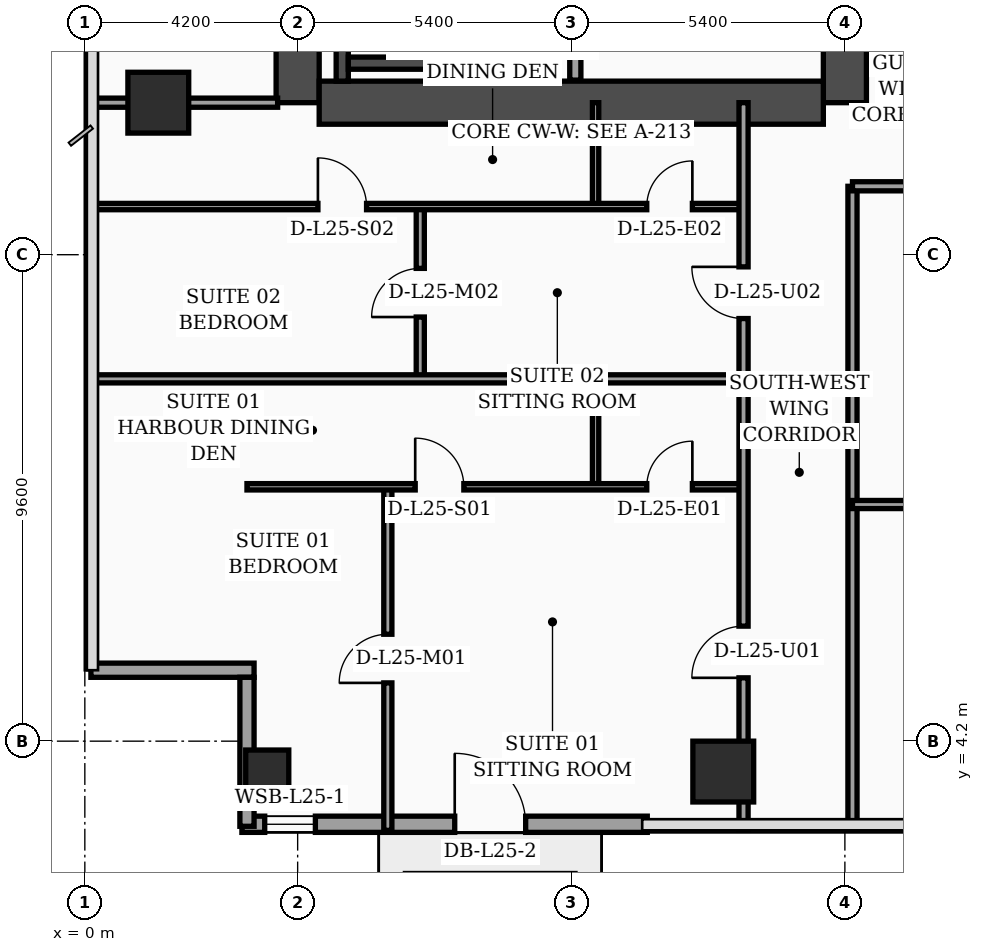
"""IFC4 building model, lengths in metres.
Left out: names, types, materials, properties, quantities, classifications, styles, units other than length and angle.
Written with IfcOpenShell. Run it as: python <this file> out.ifc"""

import sys

from ifc_helpers import new_model, si_unit, direction, frame, frame_2d, origin, origin_2d, place, context, subcontext, project, spatial, rectangle, hollow_rectangle, extrude, element, fill, save


model = new_model("IFC4")
c1 = context("Model", 3, precision=1e-05, world=origin(), true_north=direction((0.0, 1.0)))
c2 = subcontext(c1, "Body", "Model", "MODEL_VIEW")
j1 = project(units=[si_unit("LENGTHUNIT", "METRE"), si_unit("PLANEANGLEUNIT", "RADIAN")], contexts=[c1])
p1 = place(None, origin())
s1 = spatial("IfcSite", under=j1, at=p1, CompositionType="ELEMENT")
p2 = place(p1, origin())
s2 = spatial("IfcBuilding", under=s1, at=p2, CompositionType="ELEMENT")
p3 = place(p2, frame((0.0, 0.0, 105.0)))
s3 = spatial("IfcBuildingStorey", under=s2, at=p3, CompositionType="ELEMENT", Elevation=105.0)
p4 = place(p3, frame((4.2, 16.8, 0.0), z_axis=(0.0, 0.0, 1.0), x_axis=(0.0, 1.0, 0.0)))
e1 = element("IfcWall", 1, at=p4, inside=s3, PredefinedType="SHEAR", context=c2, shape_type="SweptSolid", body=[
    extrude(rectangle(XDim=21.6, YDim=0.85, at=frame_2d((10.8, 0.0))), origin(), (0.0, 0.0, 1.0), 3.56),
])
p5 = place(p3, frame((15.0, 16.8, 0.0), z_axis=(0.0, 0.0, 1.0), x_axis=(0.0, 1.0, 0.0)))
e2 = element("IfcWall", 2, at=p5, inside=s3, PredefinedType="SHEAR", context=c2, shape_type="SweptSolid", body=[
    extrude(rectangle(XDim=21.6, YDim=0.85, at=frame_2d((10.8, 0.0))), origin(), (0.0, 0.0, 1.0), 3.56),
])
p6 = place(p5, frame((8.65, 0.0, 0.0)))
e3 = element("IfcOpeningElement", 3, at=p6, cuts=e2, PredefinedType="OPENING", context=c2, shape_type="SweptSolid", body=[
    extrude(rectangle(XDim=1.1, YDim=2.2, at=frame_2d((0.55, 1.1))), frame((0.0, 0.435, 0.0), z_axis=(0.0, -1.0, 0.0), x_axis=(1.0, 0.0, 0.0)), (0.0, 0.0, 1.0), 0.87),
])
p7 = place(p5, frame((10.85, 0.0, 0.0)))
e4 = element("IfcOpeningElement", 4, at=p7, cuts=e2, PredefinedType="OPENING", context=c2, shape_type="SweptSolid", body=[
    extrude(rectangle(XDim=1.1, YDim=2.2, at=frame_2d((0.55, 1.1))), frame((0.0, 0.435, 0.0), z_axis=(0.0, -1.0, 0.0), x_axis=(1.0, 0.0, 0.0)), (0.0, 0.0, 1.0), 0.87),
])
p8 = place(p5, frame((13.5, 0.0, 0.0)))
e5 = element("IfcOpeningElement", 5, at=p8, cuts=e2, PredefinedType="OPENING", context=c2, shape_type="SweptSolid", body=[
    extrude(rectangle(XDim=1.1, YDim=2.2, at=frame_2d((0.55, 1.1))), frame((0.0, 0.435, 0.0), z_axis=(0.0, -1.0, 0.0), x_axis=(1.0, 0.0, 0.0)), (0.0, 0.0, 1.0), 0.87),
])
p9 = place(p5, frame((16.15, 0.0, 0.0)))
e6 = element("IfcOpeningElement", 6, at=p9, cuts=e2, PredefinedType="OPENING", context=c2, shape_type="SweptSolid", body=[
    extrude(rectangle(XDim=1.1, YDim=2.2, at=frame_2d((0.55, 1.1))), frame((0.0, 0.435, 0.0), z_axis=(0.0, -1.0, 0.0), x_axis=(1.0, 0.0, 0.0)), (0.0, 0.0, 1.0), 0.87),
])
p10 = place(p3, frame((4.625, 16.8, 0.0), z_axis=(0.0, 0.0, 1.0), x_axis=(1.0, 0.0, 0.0)))
e7 = element("IfcWall", 7, at=p10, inside=s3, PredefinedType="SHEAR", context=c2, shape_type="SweptSolid", body=[
    extrude(rectangle(XDim=9.95, YDim=0.85, at=frame_2d((4.975, 0.0))), origin(), (0.0, 0.0, 1.0), 3.56),
])
p11 = place(p3, frame((5.08, 17.225, 0.0), z_axis=(0.0, 0.0, 1.0), x_axis=(0.0, 1.0, 0.0)))
e8 = element("IfcWall", 8, at=p11, inside=s3, PredefinedType="SOLIDWALL", context=c2, shape_type="SweptSolid", body=[
    extrude(rectangle(XDim=9.565, YDim=0.24, at=frame_2d((4.782, 0.0))), origin(), (0.0, 0.0, 1.0), 3.56),
])
p12 = place(p3, frame((8.42, 17.225, 0.0), z_axis=(0.0, 0.0, 1.0), x_axis=(0.0, 1.0, 0.0)))
e9 = element("IfcWall", 9, at=p12, inside=s3, PredefinedType="SOLIDWALL", context=c2, shape_type="SweptSolid", body=[
    extrude(rectangle(XDim=9.565, YDim=0.24, at=frame_2d((4.782, 0.0))), origin(), (0.0, 0.0, 1.0), 3.56),
])
p13 = place(p12, frame((0.35, 0.0, 0.0)))
e10 = element("IfcOpeningElement", 10, at=p13, cuts=e9, PredefinedType="OPENING", context=c2, shape_type="SweptSolid", body=[
    extrude(rectangle(XDim=1.15, YDim=2.2, at=frame_2d((0.575, 1.1))), frame((0.0, 0.13, 0.0), z_axis=(0.0, -1.0, 0.0), x_axis=(1.0, 0.0, 0.0)), (0.0, 0.0, 1.0), 0.26),
])
p14 = place(p3, frame((5.2, 17.58, 0.0), z_axis=(0.0, 0.0, 1.0), x_axis=(1.0, 0.0, 0.0)))
e11 = element("IfcWall", 11, at=p14, inside=s3, PredefinedType="SOLIDWALL", context=c2, shape_type="SweptSolid", body=[
    extrude(rectangle(XDim=3.1, YDim=0.24, at=frame_2d((1.55, 0.0))), origin(), (0.0, 0.0, 1.0), 3.56),
])
p15 = place(p3, frame((3.6, 3.6, 0.0), z_axis=(0.0, 0.0, 1.0), x_axis=(1.0, 0.0, 0.0)))
e12 = element("IfcColumn", 12, at=p15, inside=s3, PredefinedType="COLUMN", context=c2, shape_type="SweptSolid", body=[
    extrude(hollow_rectangle(XDim=0.85, YDim=0.85, WallThickness=0.036, at=origin_2d()), origin(), (0.0, 0.0, 1.0), 3.56),
])
for number, where, z_axis, x_axis in (
    (13, (1.45, 16.8, 0.0), (0.0, 0.0, 1.0), (1.0, 0.0, 0.0)),
    (14, (12.6, 3.6, 0.0), (0.0, 0.0, 1.0), (1.0, 0.0, 0.0)),
):
    element("IfcColumn", number, at=place(p3, frame(where, z_axis=z_axis, x_axis=x_axis)), inside=s3, PredefinedType="COLUMN", context=c2, shape_type="SweptSolid", body=[
        extrude(rectangle(XDim=1.2, YDim=1.2, at=origin_2d()), origin(), (0.0, 0.0, 1.0), 3.56),
    ])
p16 = place(p3, frame((3.1, 2.56, 0.0), z_axis=(0.0, 0.0, 1.0), x_axis=(1.0, 0.0, 0.0)))
e15 = element("IfcWall", 15, at=p16, inside=s3, PredefinedType="SOLIDWALL", context=c2, shape_type="SweptSolid", body=[
    extrude(rectangle(XDim=8.0, YDim=0.32, at=frame_2d((4.0, 0.0))), origin(), (0.0, 0.0, 1.0), 3.56),
])
p17 = place(p16, frame((0.45, 0.0, 0.75)))
e16 = element("IfcOpeningElement", 16, at=p17, cuts=e15, PredefinedType="OPENING", context=c2, shape_type="SweptSolid", body=[
    extrude(rectangle(XDim=1.0, YDim=1.6, at=frame_2d((0.5, 0.8))), frame((0.0, 0.17, 0.0), z_axis=(0.0, -1.0, 0.0), x_axis=(1.0, 0.0, 0.0)), (0.0, 0.0, 1.0), 0.34),
])
p18 = place(p16, frame((4.2, 0.0, 0.0)))
e17 = element("IfcOpeningElement", 17, at=p18, cuts=e15, PredefinedType="OPENING", context=c2, shape_type="SweptSolid", body=[
    extrude(rectangle(XDim=1.4, YDim=2.25, at=frame_2d((0.7, 1.125))), frame((0.0, 0.17, 0.0), z_axis=(0.0, -1.0, 0.0), x_axis=(1.0, 0.0, 0.0)), (0.0, 0.0, 1.0), 0.34),
])
p19 = place(p3, frame((0.12, 5.6, 0.0), z_axis=(0.0, 0.0, 1.0), x_axis=(1.0, 0.0, 0.0)))
e18 = element("IfcWall", 18, at=p19, inside=s3, PredefinedType="SOLIDWALL", context=c2, shape_type="SweptSolid", body=[
    extrude(rectangle(XDim=3.22, YDim=0.28, at=frame_2d((1.61, 0.0))), origin(), (0.0, 0.0, 1.0), 2.84),
])
p20 = place(p3, frame((3.2, 5.46, 0.0), z_axis=(0.0, 0.0, 1.0), x_axis=(0.0, -1.0, 0.0)))
e19 = element("IfcWall", 19, at=p20, inside=s3, PredefinedType="SOLIDWALL", context=c2, shape_type="SweptSolid", body=[
    extrude(rectangle(XDim=2.94, YDim=0.28, at=frame_2d((1.47, 0.0))), origin(), (0.0, 0.0, 1.0), 2.84),
])
p21 = place(p3, frame((9.68, 17.245, 0.0), z_axis=(0.0, 0.0, 1.0), x_axis=(0.0, 1.0, 0.0)))
e20 = element("IfcWall", 20, at=p21, inside=s3, PredefinedType="SOLIDWALL", context=c2, shape_type="SweptSolid", body=[
    extrude(rectangle(XDim=7.755, YDim=0.22, at=frame_2d((3.877, 0.0))), origin(), (0.0, 0.0, 1.0), 3.56),
])
p22 = place(p3, frame((0.08, 16.8, 0.0), z_axis=(0.0, 0.0, 1.0), x_axis=(1.0, 0.0, 0.0)))
e21 = element("IfcWall", 21, at=p22, inside=s3, PredefinedType="PARTITIONING", context=c2, shape_type="SweptSolid", body=[
    extrude(rectangle(XDim=3.725, YDim=0.18, at=frame_2d((1.862, 0.0))), origin(), (0.0, 0.0, 1.0), 2.84),
])
p23 = place(p3, frame((10.08, 9.22, 0.0), z_axis=(0.0, 0.0, 1.0), x_axis=(0.0, 1.0, 0.0)))
e22 = element("IfcWall", 22, at=p23, inside=s3, PredefinedType="PARTITIONING", context=c2, shape_type="SweptSolid", body=[
    extrude(rectangle(XDim=2.13, YDim=0.125, at=frame_2d((1.065, 0.0))), origin(), (0.0, 0.0, 1.0), 3.09),
])
p24 = place(p3, frame((5.98, 2.44, 0.0), z_axis=(0.0, 0.0, 1.0), x_axis=(0.0, 1.0, 0.0)))
e23 = element("IfcWall", 23, at=p24, inside=s3, PredefinedType="PARTITIONING", context=c2, shape_type="SweptSolid", body=[
    extrude(rectangle(XDim=6.78, YDim=0.16, at=frame_2d((3.39, 0.0))), origin(), (0.0, 0.0, 1.0), 3.04),
])
p25 = place(p24, frame((2.91, 0.0, 0.0)))
e24 = element("IfcOpeningElement", 24, at=p25, cuts=e23, PredefinedType="OPENING", context=c2, shape_type="SweptSolid", body=[
    extrude(rectangle(XDim=0.96, YDim=2.2, at=frame_2d((0.48, 1.1))), frame((0.0, 0.09, 0.0), z_axis=(0.0, -1.0, 0.0), x_axis=(1.0, 0.0, 0.0)), (0.0, 0.0, 1.0), 0.18),
])
p26 = place(p3, frame((3.2, 9.22, 0.0), z_axis=(0.0, 0.0, 1.0), x_axis=(1.0, 0.0, 0.0)))
e25 = element("IfcWall", 25, at=p26, inside=s3, PredefinedType="PARTITIONING", context=c2, shape_type="SweptSolid", body=[
    extrude(rectangle(XDim=9.8, YDim=0.125, at=frame_2d((4.9, 0.0))), origin(), (0.0, 0.0, 1.0), 2.84),
])
p27 = place(p26, frame((3.32, 0.0, 0.0)))
e26 = element("IfcOpeningElement", 26, at=p27, cuts=e25, PredefinedType="OPENING", context=c2, shape_type="SweptSolid", body=[
    extrude(rectangle(XDim=0.96, YDim=2.2, at=frame_2d((0.48, 1.1))), frame((0.0, 0.073, 0.0), z_axis=(0.0, -1.0, 0.0), x_axis=(1.0, 0.0, 0.0)), (0.0, 0.0, 1.0), 0.145),
])
p28 = place(p26, frame((7.89, 0.0, 0.0)))
e27 = element("IfcOpeningElement", 27, at=p28, cuts=e25, PredefinedType="OPENING", context=c2, shape_type="SweptSolid", body=[
    extrude(rectangle(XDim=0.9, YDim=2.15, at=frame_2d((0.45, 1.075))), frame((0.0, 0.073, 0.0), z_axis=(0.0, -1.0, 0.0), x_axis=(1.0, 0.0, 0.0)), (0.0, 0.0, 1.0), 0.145),
])
p29 = place(p3, frame((10.08, 14.75, 0.0), z_axis=(0.0, 0.0, 1.0), x_axis=(0.0, 1.0, 0.0)))
e28 = element("IfcWall", 28, at=p29, inside=s3, PredefinedType="PARTITIONING", context=c2, shape_type="SweptSolid", body=[
    extrude(rectangle(XDim=2.05, YDim=0.125, at=frame_2d((1.025, 0.0))), origin(), (0.0, 0.0, 1.0), 3.56),
])
p30 = place(p3, frame((6.62, 11.35, 0.0), z_axis=(0.0, 0.0, 1.0), x_axis=(0.0, 1.0, 0.0)))
e29 = element("IfcWall", 29, at=p30, inside=s3, PredefinedType="PARTITIONING", context=c2, shape_type="SweptSolid", body=[
    extrude(rectangle(XDim=3.4, YDim=0.16, at=frame_2d((1.7, 0.0))), origin(), (0.0, 0.0, 1.0), 3.56),
])
p31 = place(p30, frame((1.22, 0.0, 0.0)))
e30 = element("IfcOpeningElement", 30, at=p31, cuts=e29, PredefinedType="OPENING", context=c2, shape_type="SweptSolid", body=[
    extrude(rectangle(XDim=0.96, YDim=2.2, at=frame_2d((0.48, 1.1))), frame((0.0, 0.09, 0.0), z_axis=(0.0, -1.0, 0.0), x_axis=(1.0, 0.0, 0.0)), (0.0, 0.0, 1.0), 0.18),
])
p32 = place(p3, frame((0.08, 14.75, 0.0), z_axis=(0.0, 0.0, 1.0), x_axis=(1.0, 0.0, 0.0)))
e31 = element("IfcWall", 31, at=p32, inside=s3, PredefinedType="PARTITIONING", context=c2, shape_type="SweptSolid", body=[
    extrude(rectangle(XDim=12.92, YDim=0.125, at=frame_2d((6.46, 0.0))), origin(), (0.0, 0.0, 1.0), 2.84),
])
p33 = place(p32, frame((4.52, 0.0, 0.0)))
e32 = element("IfcOpeningElement", 32, at=p33, cuts=e31, PredefinedType="OPENING", context=c2, shape_type="SweptSolid", body=[
    extrude(rectangle(XDim=0.96, YDim=2.2, at=frame_2d((0.48, 1.1))), frame((0.0, 0.073, 0.0), z_axis=(0.0, -1.0, 0.0), x_axis=(1.0, 0.0, 0.0)), (0.0, 0.0, 1.0), 0.145),
])
p34 = place(p32, frame((11.01, 0.0, 0.0)))
e33 = element("IfcOpeningElement", 33, at=p34, cuts=e31, PredefinedType="OPENING", context=c2, shape_type="SweptSolid", body=[
    extrude(rectangle(XDim=0.9, YDim=2.15, at=frame_2d((0.45, 1.075))), frame((0.0, 0.073, 0.0), z_axis=(0.0, -1.0, 0.0), x_axis=(1.0, 0.0, 0.0)), (0.0, 0.0, 1.0), 0.145),
])
p35 = place(p3, frame((0.08, 11.35, 0.0), z_axis=(0.0, 0.0, 1.0), x_axis=(1.0, 0.0, 0.0)))
e34 = element("IfcWall", 34, at=p35, inside=s3, PredefinedType="PARTITIONING", context=c2, shape_type="SweptSolid", body=[
    extrude(rectangle(XDim=12.92, YDim=0.16, at=frame_2d((6.46, 0.0))), origin(), (0.0, 0.0, 1.0), 2.84),
])
p36 = place(p3, frame((13.0, 2.44, 0.0), z_axis=(0.0, 0.0, 1.0), x_axis=(0.0, 1.0, 0.0)))
e35 = element("IfcWall", 35, at=p36, inside=s3, PredefinedType="PARTITIONING", context=c2, shape_type="SweptSolid", body=[
    extrude(rectangle(XDim=14.36, YDim=0.18, at=frame_2d((7.18, 0.0))), origin(), (0.0, 0.0, 1.0), 2.84),
])
p37 = place(p36, frame((3.01, 0.0, 0.0)))
e36 = element("IfcOpeningElement", 36, at=p37, cuts=e35, PredefinedType="OPENING", context=c2, shape_type="SweptSolid", body=[
    extrude(rectangle(XDim=1.02, YDim=2.2, at=frame_2d((0.51, 1.1))), frame((0.0, 0.1, 0.0), z_axis=(0.0, -1.0, 0.0), x_axis=(1.0, 0.0, 0.0)), (0.0, 0.0, 1.0), 0.2),
])
p38 = place(p36, frame((10.1, 0.0, 0.0)))
e37 = element("IfcOpeningElement", 37, at=p38, cuts=e35, PredefinedType="OPENING", context=c2, shape_type="SweptSolid", body=[
    extrude(rectangle(XDim=1.02, YDim=2.2, at=frame_2d((0.51, 1.1))), frame((0.0, 0.1, 0.0), z_axis=(0.0, -1.0, 0.0), x_axis=(1.0, 0.0, 0.0)), (0.0, 0.0, 1.0), 0.2),
])
p39 = place(p3, frame((15.15, 2.44, 0.0), z_axis=(0.0, 0.0, 1.0), x_axis=(0.0, 1.0, 0.0)))
e38 = element("IfcWall", 38, at=p39, inside=s3, PredefinedType="PARTITIONING", context=c2, shape_type="SweptSolid", body=[
    extrude(rectangle(XDim=12.71, YDim=0.18, at=frame_2d((6.355, 0.0))), origin(), (0.0, 0.0, 1.0), 3.04),
])
p40 = place(p3, frame((15.15, 8.87, 0.0), z_axis=(0.0, 0.0, 1.0), x_axis=(1.0, 0.0, 0.0)))
e39 = element("IfcWall", 39, at=p40, inside=s3, PredefinedType="PARTITIONING", context=c2, shape_type="SweptSolid", body=[
    extrude(rectangle(XDim=4.45, YDim=0.16, at=frame_2d((2.225, 0.0))), origin(), (0.0, 0.0, 1.0), 3.56),
])
p41 = place(p40, frame((1.75, 0.0, 0.0)))
e40 = element("IfcOpeningElement", 40, at=p41, cuts=e39, PredefinedType="OPENING", context=c2, shape_type="SweptSolid", body=[
    extrude(rectangle(XDim=0.96, YDim=2.2, at=frame_2d((0.48, 1.1))), frame((0.0, 0.09, 0.0), z_axis=(0.0, -1.0, 0.0), x_axis=(1.0, 0.0, 0.0)), (0.0, 0.0, 1.0), 0.18),
])
p42 = place(p3, frame((15.15, 15.15, 0.0), z_axis=(0.0, 0.0, 1.0), x_axis=(1.0, 0.0, 0.0)))
e41 = element("IfcWall", 41, at=p42, inside=s3, PredefinedType="PARTITIONING", context=c2, shape_type="SweptSolid", body=[
    extrude(rectangle(XDim=6.45, YDim=0.18, at=frame_2d((3.225, 0.0))), origin(), (0.0, 0.0, 1.0), 2.49),
])
p43 = place(p42, frame((1.74, 0.0, 0.0)))
e42 = element("IfcOpeningElement", 42, at=p43, cuts=e41, PredefinedType="OPENING", context=c2, shape_type="SweptSolid", body=[
    extrude(rectangle(XDim=1.02, YDim=2.2, at=frame_2d((0.51, 1.1))), frame((0.0, 0.1, 0.0), z_axis=(0.0, -1.0, 0.0), x_axis=(1.0, 0.0, 0.0)), (0.0, 0.0, 1.0), 0.2),
])
p44 = place(p17, origin())
e43 = element("IfcWindow", 43, at=p44, inside=s3, PartitioningType="SINGLE_PANEL", PredefinedType="WINDOW", context=c2, shape_type="SweptSolid", body=[
    extrude(rectangle(XDim=1.0, YDim=1.6, at=frame_2d((0.5, 0.8))), frame((0.0, 0.03, 0.0), z_axis=(0.0, -1.0, 0.0), x_axis=(1.0, 0.0, 0.0)), (0.0, 0.0, 1.0), 0.06),
])
fill(e16, e43)
p45 = place(p18, origin())
e44 = element("IfcDoor", 44, at=p45, inside=s3, OperationType="SINGLE_SWING_LEFT", PredefinedType="DOOR", context=c2, shape_type="SweptSolid", body=[
    extrude(rectangle(XDim=1.4, YDim=2.25, at=frame_2d((0.7, 1.125))), frame((0.0, 0.025, 0.0), z_axis=(0.0, -1.0, 0.0), x_axis=(1.0, 0.0, 0.0)), (0.0, 0.0, 1.0), 0.05),
])
fill(e17, e44)
p46 = place(p25, origin())
e45 = element("IfcDoor", 45, at=p46, inside=s3, OperationType="SINGLE_SWING_LEFT", PredefinedType="DOOR", context=c2, shape_type="SweptSolid", body=[
    extrude(rectangle(XDim=0.96, YDim=2.2, at=frame_2d((0.48, 1.1))), frame((0.0, 0.025, 0.0), z_axis=(0.0, -1.0, 0.0), x_axis=(1.0, 0.0, 0.0)), (0.0, 0.0, 1.0), 0.05),
])
fill(e24, e45)
p47 = place(p27, origin())
e46 = element("IfcDoor", 46, at=p47, inside=s3, OperationType="SINGLE_SWING_LEFT", PredefinedType="DOOR", context=c2, shape_type="SweptSolid", body=[
    extrude(rectangle(XDim=0.96, YDim=2.2, at=frame_2d((0.48, 1.1))), frame((0.0, 0.025, 0.0), z_axis=(0.0, -1.0, 0.0), x_axis=(1.0, 0.0, 0.0)), (0.0, 0.0, 1.0), 0.05),
])
fill(e26, e46)
p48 = place(p28, origin())
e47 = element("IfcDoor", 47, at=p48, inside=s3, OperationType="SINGLE_SWING_RIGHT", PredefinedType="DOOR", context=c2, shape_type="SweptSolid", body=[
    extrude(rectangle(XDim=0.9, YDim=2.15, at=frame_2d((0.45, 1.075))), frame((0.0, 0.025, 0.0), z_axis=(0.0, -1.0, 0.0), x_axis=(1.0, 0.0, 0.0)), (0.0, 0.0, 1.0), 0.05),
])
fill(e27, e47)
p49 = place(p31, origin())
e48 = element("IfcDoor", 48, at=p49, inside=s3, OperationType="SINGLE_SWING_LEFT", PredefinedType="DOOR", context=c2, shape_type="SweptSolid", body=[
    extrude(rectangle(XDim=0.96, YDim=2.2, at=frame_2d((0.48, 1.1))), frame((0.0, 0.025, 0.0), z_axis=(0.0, -1.0, 0.0), x_axis=(1.0, 0.0, 0.0)), (0.0, 0.0, 1.0), 0.05),
])
fill(e30, e48)
p50 = place(p33, origin())
e49 = element("IfcDoor", 49, at=p50, inside=s3, OperationType="SINGLE_SWING_LEFT", PredefinedType="DOOR", context=c2, shape_type="SweptSolid", body=[
    extrude(rectangle(XDim=0.96, YDim=2.2, at=frame_2d((0.48, 1.1))), frame((0.0, 0.025, 0.0), z_axis=(0.0, -1.0, 0.0), x_axis=(1.0, 0.0, 0.0)), (0.0, 0.0, 1.0), 0.05),
])
fill(e32, e49)
p51 = place(p34, origin())
e50 = element("IfcDoor", 50, at=p51, inside=s3, OperationType="SINGLE_SWING_RIGHT", PredefinedType="DOOR", context=c2, shape_type="SweptSolid", body=[
    extrude(rectangle(XDim=0.9, YDim=2.15, at=frame_2d((0.45, 1.075))), frame((0.0, 0.025, 0.0), z_axis=(0.0, -1.0, 0.0), x_axis=(1.0, 0.0, 0.0)), (0.0, 0.0, 1.0), 0.05),
])
fill(e33, e50)
p52 = place(p37, origin())
e51 = element("IfcDoor", 51, at=p52, inside=s3, OperationType="SINGLE_SWING_LEFT", PredefinedType="DOOR", context=c2, shape_type="SweptSolid", body=[
    extrude(rectangle(XDim=1.02, YDim=2.2, at=frame_2d((0.51, 1.1))), frame((0.0, 0.025, 0.0), z_axis=(0.0, -1.0, 0.0), x_axis=(1.0, 0.0, 0.0)), (0.0, 0.0, 1.0), 0.05),
])
fill(e36, e51)
p53 = place(p38, origin())
e52 = element("IfcDoor", 52, at=p53, inside=s3, OperationType="SINGLE_SWING_RIGHT", PredefinedType="DOOR", context=c2, shape_type="SweptSolid", body=[
    extrude(rectangle(XDim=1.02, YDim=2.2, at=frame_2d((0.51, 1.1))), frame((0.0, 0.025, 0.0), z_axis=(0.0, -1.0, 0.0), x_axis=(1.0, 0.0, 0.0)), (0.0, 0.0, 1.0), 0.05),
])
fill(e37, e52)
p54 = place(p13, origin())
e53 = element("IfcDoor", 53, at=p54, inside=s3, OperationType="SINGLE_SWING_LEFT", PredefinedType="DOOR", context=c2, shape_type="SweptSolid", body=[
    extrude(rectangle(XDim=1.15, YDim=2.2, at=frame_2d((0.575, 1.1))), frame((0.0, 0.025, 0.0), z_axis=(0.0, -1.0, 0.0), x_axis=(1.0, 0.0, 0.0)), (0.0, 0.0, 1.0), 0.05),
])
fill(e10, e53)
save(model, sys.argv[1])
